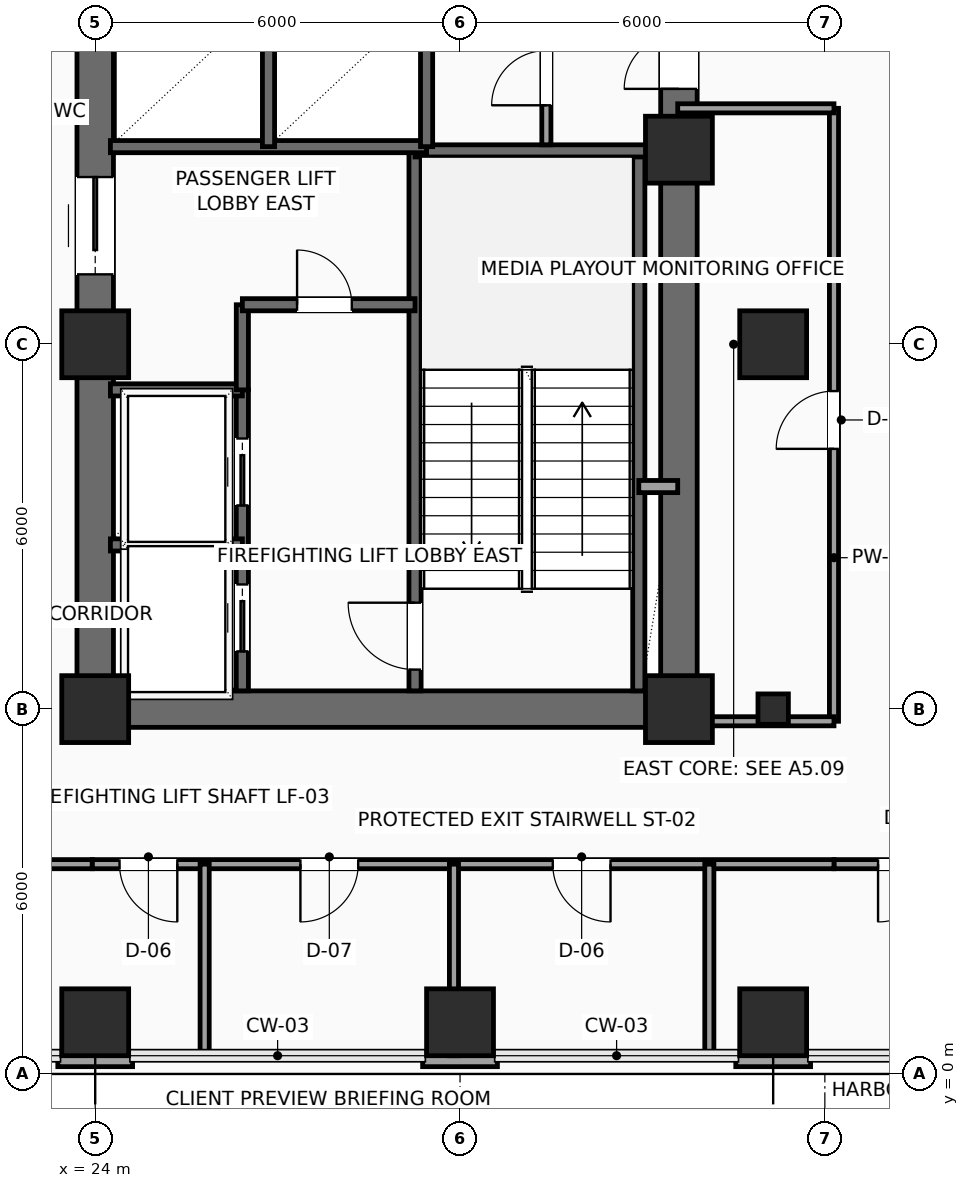
"""IFC4 building model, lengths in metres.
Left out: names, types, materials, properties, quantities, classifications, styles, units other than length and angle.
Written with IfcOpenShell. Run it as: python <this file> out.ifc"""

import sys

from ifc_helpers import new_model, si_unit, direction, frame, frame_2d, origin, origin_2d, place, context, subcontext, project, spatial, rectangle, hollow_rectangle, extrude, element, fill, save


model = new_model("IFC4")
c1 = context("Model", 3, precision=1e-05, world=origin(), true_north=direction((0.0, 1.0)))
c2 = subcontext(c1, "Body", "Model", "MODEL_VIEW")
j1 = project(units=[si_unit("LENGTHUNIT", "METRE"), si_unit("PLANEANGLEUNIT", "RADIAN")], contexts=[c1])
p1 = place(None, origin())
s1 = spatial("IfcSite", under=j1, at=p1, CompositionType="ELEMENT")
p2 = place(p1, origin())
s2 = spatial("IfcBuilding", under=s1, at=p2, CompositionType="ELEMENT")
p3 = place(p2, frame((0.0, 0.0, 160.65)))
s3 = spatial("IfcBuildingStorey", under=s2, at=p3, CompositionType="ELEMENT", Elevation=160.65)
for number, where, z_axis, x_axis in (
    (1, (24.0, 6.0, 0.0), (0.0, 0.0, 1.0), (1.0, 0.0, 0.0)),
    (2, (24.0, 12.0, 0.0), (0.0, 0.0, 1.0), (1.0, 0.0, 0.0)),
    (3, (33.6, 6.0, 0.0), (0.0, 0.0, 1.0), (1.0, 0.0, 0.0)),
    (4, (33.6, 15.2, 0.0), (0.0, 0.0, 1.0), (1.0, 0.0, 0.0)),
    (5, (24.0, 0.85, 0.0), (0.0, 0.0, 1.0), (1.0, 0.0, 0.0)),
    (6, (30.0, 0.85, 0.0), (0.0, 0.0, 1.0), (1.0, 0.0, 0.0)),
    (7, (35.15, 0.85, 0.0), (0.0, 0.0, 1.0), (1.0, 0.0, 0.0)),
):
    element("IfcColumn", number, at=place(p3, frame(where, z_axis=z_axis, x_axis=x_axis)), inside=s3, PredefinedType="COLUMN", context=c2, shape_type="SweptSolid", body=[
        extrude(rectangle(XDim=1.1, YDim=1.1, at=origin_2d()), origin(), (0.0, 0.0, 1.0), 3.75),
    ])
p4 = place(p3, frame((35.15, 6.0, 0.0), z_axis=(0.0, 0.0, 1.0), x_axis=(1.0, 0.0, 0.0)))
e8 = element("IfcColumn", 8, at=p4, inside=s3, PredefinedType="COLUMN", context=c2, shape_type="SweptSolid", body=[
    extrude(hollow_rectangle(XDim=0.5, YDim=0.5, WallThickness=0.025, InnerFilletRadius=0.025, OuterFilletRadius=0.04, at=origin_2d()), origin(), (0.0, 0.0, 1.0), 3.75),
])
p5 = place(p3, frame((35.15, 12.0, 0.0), z_axis=(0.0, 0.0, 1.0), x_axis=(1.0, 0.0, 0.0)))
e9 = element("IfcColumn", 9, at=p5, inside=s3, PredefinedType="COLUMN", context=c2, shape_type="SweptSolid", body=[
    extrude(rectangle(XDim=1.1, YDim=1.1, at=origin_2d()), origin(), (0.0, 0.0, 1.0), 3.75),
])
for number, where, z_axis, x_axis in (
    (10, (35.765, 0.24, 0.0), (0.0, 0.0, 1.0), (-1.0, 0.0, 0.0)),
    (11, (30.615, 0.24, 0.0), (0.0, 0.0, 1.0), (-1.0, 0.0, 0.0)),
    (12, (24.615, 0.24, 0.0), (0.0, 0.0, 1.0), (-1.0, 0.0, 0.0)),
):
    element("IfcWall", number, at=place(p3, frame(where, z_axis=z_axis, x_axis=x_axis)), inside=s3, PredefinedType="SOLIDWALL", context=c2, shape_type="SweptSolid", body=[
        extrude(rectangle(XDim=1.23, YDim=0.24, at=frame_2d((0.615, 0.0))), origin(), (0.0, 0.0, 1.0), 3.425),
    ])
p6 = place(p3, frame((24.0, 6.0, 0.0), z_axis=(0.0, 0.0, 1.0), x_axis=(1.0, 0.0, 0.0)))
e13 = element("IfcWall", 13, at=p6, inside=s3, PredefinedType="SHEAR", context=c2, shape_type="SweptSolid", body=[
    extrude(rectangle(XDim=9.6, YDim=0.6, at=frame_2d((4.8, 0.0))), origin(), (0.0, 0.0, 1.0), 3.425),
])
p7 = place(p3, frame((24.0, 6.0, 0.0), z_axis=(0.0, 0.0, 1.0), x_axis=(0.0, 1.0, 0.0)))
e14 = element("IfcWall", 14, at=p7, inside=s3, PredefinedType="SHEAR", context=c2, shape_type="SweptSolid", body=[
    extrude(rectangle(XDim=12.0, YDim=0.6, at=frame_2d((6.0, 0.0))), origin(), (0.0, 0.0, 1.0), 3.425),
])
p8 = place(p7, frame((7.15, 0.0, 0.0)))
e15 = element("IfcOpeningElement", 15, at=p8, cuts=e14, PredefinedType="OPENING", context=c2, shape_type="SweptSolid", body=[
    extrude(rectangle(XDim=1.6, YDim=2.3, at=frame_2d((0.8, 1.15))), frame((0.0, 0.31, 0.0), z_axis=(0.0, -1.0, 0.0), x_axis=(1.0, 0.0, 0.0)), (0.0, 0.0, 1.0), 0.62),
])
p9 = place(p3, frame((33.6, 6.0, 0.0), z_axis=(0.0, 0.0, 1.0), x_axis=(0.0, 1.0, 0.0)))
e16 = element("IfcWall", 16, at=p9, inside=s3, PredefinedType="SHEAR", context=c2, shape_type="SweptSolid", body=[
    extrude(rectangle(XDim=12.0, YDim=0.6, at=frame_2d((6.0, 0.0))), origin(), (0.0, 0.0, 1.0), 3.425),
])
p10 = place(p9, frame((10.2, 0.0, 0.0)))
e17 = element("IfcOpeningElement", 17, at=p10, cuts=e16, PredefinedType="OPENING", context=c2, shape_type="SweptSolid", body=[
    extrude(rectangle(XDim=0.9, YDim=2.15, at=frame_2d((0.45, 1.075))), frame((0.0, 0.31, 0.0), z_axis=(0.0, -1.0, 0.0), x_axis=(1.0, 0.0, 0.0)), (0.0, 0.0, 1.0), 0.62),
])
p11 = place(p3, frame((29.26, 6.3, 0.0), z_axis=(0.0, 0.0, 1.0), x_axis=(0.0, 1.0, 0.0)))
e18 = element("IfcWall", 18, at=p11, inside=s3, PredefinedType="SHEAR", context=c2, shape_type="SweptSolid", body=[
    extrude(rectangle(XDim=8.88, YDim=0.2, at=frame_2d((4.44, 0.0))), origin(), (0.0, 0.0, 1.0), 3.425),
])
p12 = place(p11, frame((0.35, 0.0, 0.0)))
e19 = element("IfcOpeningElement", 19, at=p12, cuts=e18, PredefinedType="OPENING", context=c2, shape_type="SweptSolid", body=[
    extrude(rectangle(XDim=1.1, YDim=2.2, at=frame_2d((0.55, 1.1))), frame((0.0, 0.11, 0.0), z_axis=(0.0, -1.0, 0.0), x_axis=(1.0, 0.0, 0.0)), (0.0, 0.0, 1.0), 0.22),
])
p13 = place(p3, frame((32.94, 6.3, 0.0), z_axis=(0.0, 0.0, 1.0), x_axis=(0.0, 1.0, 0.0)))
e20 = element("IfcWall", 20, at=p13, inside=s3, PredefinedType="SHEAR", context=c2, shape_type="SweptSolid", body=[
    extrude(rectangle(XDim=8.88, YDim=0.2, at=frame_2d((4.44, 0.0))), origin(), (0.0, 0.0, 1.0), 3.425),
])
p14 = place(p3, frame((29.26, 15.18, 0.0), z_axis=(0.0, 0.0, 1.0), x_axis=(1.0, 0.0, 0.0)))
e21 = element("IfcWall", 21, at=p14, inside=s3, PredefinedType="SHEAR", context=c2, shape_type="SweptSolid", body=[
    extrude(rectangle(XDim=4.04, YDim=0.2, at=frame_2d((2.02, 0.0))), origin(), (0.0, 0.0, 1.0), 3.425),
])
p15 = place(p3, frame((26.42, 6.3, 0.0), z_axis=(0.0, 0.0, 1.0), x_axis=(0.0, 1.0, 0.0)))
e22 = element("IfcWall", 22, at=p15, inside=s3, PredefinedType="SHEAR", context=c2, shape_type="SweptSolid", body=[
    extrude(rectangle(XDim=4.95, YDim=0.2, at=frame_2d((2.475, 0.0))), origin(), (0.0, 0.0, 1.0), 3.425),
])
p16 = place(p15, frame((0.65, 0.0, 0.0)))
e23 = element("IfcOpeningElement", 23, at=p16, cuts=e22, PredefinedType="OPENING", context=c2, shape_type="SweptSolid", body=[
    extrude(rectangle(XDim=1.1, YDim=2.2, at=frame_2d((0.55, 1.1))), frame((0.0, 0.11, 0.0), z_axis=(0.0, -1.0, 0.0), x_axis=(1.0, 0.0, 0.0)), (0.0, 0.0, 1.0), 0.22),
])
p17 = place(p15, frame((3.05, 0.0, 0.0)))
e24 = element("IfcOpeningElement", 24, at=p17, cuts=e22, PredefinedType="OPENING", context=c2, shape_type="SweptSolid", body=[
    extrude(rectangle(XDim=1.1, YDim=2.2, at=frame_2d((0.55, 1.1))), frame((0.0, 0.11, 0.0), z_axis=(0.0, -1.0, 0.0), x_axis=(1.0, 0.0, 0.0)), (0.0, 0.0, 1.0), 0.22),
])
for number, where, z_axis, x_axis in (
    (25, (24.25, 8.7, 0.0), (0.0, 0.0, 1.0), (1.0, 0.0, 0.0)),
    (26, (24.25, 11.25, 0.0), (0.0, 0.0, 1.0), (1.0, 0.0, 0.0)),
):
    element("IfcWall", number, at=place(p3, frame(where, z_axis=z_axis, x_axis=x_axis)), inside=s3, PredefinedType="SHEAR", context=c2, shape_type="SweptSolid", body=[
        extrude(rectangle(XDim=2.17, YDim=0.2, at=frame_2d((1.085, 0.0))), origin(), (0.0, 0.0, 1.0), 3.425),
    ])
p18 = place(p3, frame((26.42, 11.25, 0.0), z_axis=(0.0, 0.0, 1.0), x_axis=(0.0, 1.0, 0.0)))
e27 = element("IfcWall", 27, at=p18, inside=s3, PredefinedType="SHEAR", context=c2, shape_type="SweptSolid", body=[
    extrude(rectangle(XDim=1.4, YDim=0.2, at=frame_2d((0.7, 0.0))), origin(), (0.0, 0.0, 1.0), 3.425),
])
p19 = place(p3, frame((26.42, 12.65, 0.0), z_axis=(0.0, 0.0, 1.0), x_axis=(1.0, 0.0, 0.0)))
e28 = element("IfcWall", 28, at=p19, inside=s3, PredefinedType="SHEAR", context=c2, shape_type="SweptSolid", body=[
    extrude(rectangle(XDim=2.84, YDim=0.2, at=frame_2d((1.42, 0.0))), origin(), (0.0, 0.0, 1.0), 3.425),
])
p20 = place(p19, frame((0.9, 0.0, 0.0)))
e29 = element("IfcOpeningElement", 29, at=p20, cuts=e28, PredefinedType="OPENING", context=c2, shape_type="SweptSolid", body=[
    extrude(rectangle(XDim=0.9, YDim=2.15, at=frame_2d((0.45, 1.075))), frame((0.0, 0.11, 0.0), z_axis=(0.0, -1.0, 0.0), x_axis=(1.0, 0.0, 0.0)), (0.0, 0.0, 1.0), 0.22),
])
p21 = place(p3, frame((32.94, 9.66, 0.0), z_axis=(0.0, 0.0, 1.0), x_axis=(1.0, 0.0, 0.0)))
e30 = element("IfcWall", 30, at=p21, inside=s3, PredefinedType="SOLIDWALL", context=c2, shape_type="SweptSolid", body=[
    extrude(rectangle(XDim=0.64, YDim=0.2, at=frame_2d((0.32, 0.0))), origin(), (0.0, 0.0, 1.0), 3.425),
])
p22 = place(p3, frame((24.25, 15.25, 0.0), z_axis=(0.0, 0.0, 1.0), x_axis=(1.0, 0.0, 0.0)))
e31 = element("IfcWall", 31, at=p22, inside=s3, PredefinedType="SHEAR", context=c2, shape_type="SweptSolid", body=[
    extrude(rectangle(XDim=5.2, YDim=0.2, at=frame_2d((2.6, 0.0))), origin(), (0.0, 0.0, 1.0), 3.425),
])
p23 = place(p3, frame((26.85, 15.25, 0.0), z_axis=(0.0, 0.0, 1.0), x_axis=(0.0, 1.0, 0.0)))
e32 = element("IfcWall", 32, at=p23, inside=s3, PredefinedType="SHEAR", context=c2, shape_type="SweptSolid", body=[
    extrude(rectangle(XDim=2.4, YDim=0.2, at=frame_2d((1.2, 0.0))), origin(), (0.0, 0.0, 1.0), 3.425),
])
p24 = place(p3, frame((29.45, 15.25, 0.0), z_axis=(0.0, 0.0, 1.0), x_axis=(0.0, 1.0, 0.0)))
e33 = element("IfcWall", 33, at=p24, inside=s3, PredefinedType="SHEAR", context=c2, shape_type="SweptSolid", body=[
    extrude(rectangle(XDim=2.45, YDim=0.2, at=frame_2d((1.225, 0.0))), origin(), (0.0, 0.0, 1.0), 3.425),
])
p25 = place(p3, frame((31.42, 15.28, 0.0), z_axis=(0.0, 0.0, 1.0), x_axis=(0.0, 1.0, 0.0)))
e34 = element("IfcWall", 34, at=p25, inside=s3, PredefinedType="PARTITIONING", context=c2, shape_type="SweptSolid", body=[
    extrude(rectangle(XDim=2.42, YDim=0.15, at=frame_2d((1.21, 0.0))), origin(), (0.0, 0.0, 1.0), 3.425),
])
p26 = place(p25, frame((0.65, 0.0, 0.0)))
e35 = element("IfcOpeningElement", 35, at=p26, cuts=e34, PredefinedType="OPENING", context=c2, shape_type="SweptSolid", body=[
    extrude(rectangle(XDim=0.9, YDim=2.15, at=frame_2d((0.45, 1.075))), frame((0.0, 0.085, 0.0), z_axis=(0.0, -1.0, 0.0), x_axis=(1.0, 0.0, 0.0)), (0.0, 0.0, 1.0), 0.17),
])
p27 = place(p3, frame((36.15, 5.8, 0.0), z_axis=(0.0, 0.0, 1.0), x_axis=(0.0, 1.0, 0.0)))
e36 = element("IfcWall", 36, at=p27, inside=s3, PredefinedType="PARTITIONING", context=c2, shape_type="SweptSolid", body=[
    extrude(rectangle(XDim=10.08, YDim=0.15, at=frame_2d((5.04, 0.0))), origin(), (0.0, 0.0, 1.0), 3.425),
])
p28 = place(p27, frame((4.48, 0.0, 0.0)))
e37 = element("IfcOpeningElement", 37, at=p28, cuts=e36, PredefinedType="OPENING", context=c2, shape_type="SweptSolid", body=[
    extrude(rectangle(XDim=0.95, YDim=2.15, at=frame_2d((0.475, 1.075))), frame((0.0, 0.085, 0.0), z_axis=(0.0, -1.0, 0.0), x_axis=(1.0, 0.0, 0.0)), (0.0, 0.0, 1.0), 0.17),
])
p29 = place(p3, frame((36.15, 15.88, 0.0), z_axis=(0.0, 0.0, 1.0), x_axis=(-1.0, 0.0, 0.0)))
e38 = element("IfcWall", 38, at=p29, inside=s3, PredefinedType="PARTITIONING", context=c2, shape_type="SweptSolid", body=[
    extrude(rectangle(XDim=2.57, YDim=0.15, at=frame_2d((1.285, 0.0))), origin(), (0.0, 0.0, 1.0), 3.425),
])
p30 = place(p3, frame((38.55, 3.45, 0.0), z_axis=(0.0, 0.0, 1.0), x_axis=(-1.0, 0.0, 0.0)))
e39 = element("IfcWall", 39, at=p30, inside=s3, PredefinedType="PARTITIONING", context=c2, shape_type="SweptSolid", body=[
    extrude(rectangle(XDim=2.4, YDim=0.15, at=frame_2d((1.2, 0.0))), origin(), (0.0, 0.0, 1.0), 2.967),
])
p31 = place(p30, frame((0.725, 0.0, 0.0)))
e40 = element("IfcOpeningElement", 40, at=p31, cuts=e39, PredefinedType="OPENING", context=c2, shape_type="SweptSolid", body=[
    extrude(rectangle(XDim=0.95, YDim=2.15, at=frame_2d((0.475, 1.075))), frame((0.0, 0.085, 0.0), z_axis=(0.0, -1.0, 0.0), x_axis=(1.0, 0.0, 0.0)), (0.0, 0.0, 1.0), 0.17),
])
p32 = place(p3, frame((36.15, 3.45, 0.0), z_axis=(0.0, 0.0, 1.0), x_axis=(-1.0, 0.0, 0.0)))
e41 = element("IfcWall", 41, at=p32, inside=s3, PredefinedType="PARTITIONING", context=c2, shape_type="SweptSolid", body=[
    extrude(rectangle(XDim=12.2, YDim=0.15, at=frame_2d((6.1, 0.0))), origin(), (0.0, 0.0, 1.0), 2.967),
])
p33 = place(p32, frame((10.8, 0.0, 0.0)))
e42 = element("IfcOpeningElement", 42, at=p33, cuts=e41, PredefinedType="OPENING", context=c2, shape_type="SweptSolid", body=[
    extrude(rectangle(XDim=0.95, YDim=2.15, at=frame_2d((0.475, 1.075))), frame((0.0, 0.085, 0.0), z_axis=(0.0, -1.0, 0.0), x_axis=(1.0, 0.0, 0.0)), (0.0, 0.0, 1.0), 0.17),
])
p34 = place(p32, frame((7.825, 0.0, 0.0)))
e43 = element("IfcOpeningElement", 43, at=p34, cuts=e41, PredefinedType="OPENING", context=c2, shape_type="SweptSolid", body=[
    extrude(rectangle(XDim=0.95, YDim=2.15, at=frame_2d((0.475, 1.075))), frame((0.0, 0.085, 0.0), z_axis=(0.0, -1.0, 0.0), x_axis=(1.0, 0.0, 0.0)), (0.0, 0.0, 1.0), 0.17),
])
p35 = place(p32, frame((3.675, 0.0, 0.0)))
e44 = element("IfcOpeningElement", 44, at=p35, cuts=e41, PredefinedType="OPENING", context=c2, shape_type="SweptSolid", body=[
    extrude(rectangle(XDim=0.95, YDim=2.15, at=frame_2d((0.475, 1.075))), frame((0.0, 0.085, 0.0), z_axis=(0.0, -1.0, 0.0), x_axis=(1.0, 0.0, 0.0)), (0.0, 0.0, 1.0), 0.17),
])
p36 = place(p3, frame((23.95, 3.45, 0.0), z_axis=(0.0, 0.0, 1.0), x_axis=(-1.0, 0.0, 0.0)))
e45 = element("IfcWall", 45, at=p36, inside=s3, PredefinedType="PARTITIONING", context=c2, shape_type="SweptSolid", body=[
    extrude(rectangle(XDim=2.6, YDim=0.15, at=frame_2d((1.3, 0.0))), origin(), (0.0, 0.0, 1.0), 2.967),
])
for number, where, z_axis, x_axis in (
    (46, (25.8, 0.3, 0.0), (0.0, 0.0, 1.0), (0.0, 1.0, 0.0)),
    (47, (29.9, 0.3, 0.0), (0.0, 0.0, 1.0), (0.0, 1.0, 0.0)),
    (48, (34.1, 0.3, 0.0), (0.0, 0.0, 1.0), (0.0, 1.0, 0.0)),
):
    element("IfcWall", number, at=place(p3, frame(where, z_axis=z_axis, x_axis=x_axis)), inside=s3, PredefinedType="PARTITIONING", context=c2, shape_type="SweptSolid", body=[
        extrude(rectangle(XDim=3.15, YDim=0.15, at=frame_2d((1.575, 0.0))), origin(), (0.0, 0.0, 1.0), 3.425),
    ])
p37 = place(p3, frame((33.65, 5.8, 0.0), z_axis=(0.0, 0.0, 1.0), x_axis=(1.0, 0.0, 0.0)))
e49 = element("IfcWall", 49, at=p37, inside=s3, PredefinedType="PARTITIONING", context=c2, shape_type="SweptSolid", body=[
    extrude(rectangle(XDim=2.5, YDim=0.15, at=frame_2d((1.25, 0.0))), origin(), (0.0, 0.0, 1.0), 2.917),
])
p38 = place(p8, origin())
e50 = element("IfcDoor", 50, at=p38, inside=s3, OperationType="DOUBLE_DOOR_SLIDING", PredefinedType="DOOR", context=c2, shape_type="SweptSolid", body=[
    extrude(rectangle(XDim=1.6, YDim=2.3, at=frame_2d((0.8, 1.15))), frame((0.0, 0.025, 0.0), z_axis=(0.0, -1.0, 0.0), x_axis=(1.0, 0.0, 0.0)), (0.0, 0.0, 1.0), 0.05),
])
fill(e15, e50)
p39 = place(p10, origin())
e51 = element("IfcDoor", 51, at=p39, inside=s3, OperationType="SINGLE_SWING_LEFT", PredefinedType="DOOR", context=c2, shape_type="SweptSolid", body=[
    extrude(rectangle(XDim=0.9, YDim=2.15, at=frame_2d((0.45, 1.075))), frame((0.0, 0.025, 0.0), z_axis=(0.0, -1.0, 0.0), x_axis=(1.0, 0.0, 0.0)), (0.0, 0.0, 1.0), 0.05),
])
fill(e17, e51)
p40 = place(p12, origin())
e52 = element("IfcDoor", 52, at=p40, inside=s3, OperationType="SINGLE_SWING_RIGHT", PredefinedType="DOOR", context=c2, shape_type="SweptSolid", body=[
    extrude(rectangle(XDim=1.1, YDim=2.2, at=frame_2d((0.55, 1.1))), frame((0.0, 0.025, 0.0), z_axis=(0.0, -1.0, 0.0), x_axis=(1.0, 0.0, 0.0)), (0.0, 0.0, 1.0), 0.05),
])
fill(e19, e52)
p41 = place(p16, origin())
e53 = element("IfcDoor", 53, at=p41, inside=s3, OperationType="SLIDING_TO_LEFT", PredefinedType="DOOR", context=c2, shape_type="SweptSolid", body=[
    extrude(rectangle(XDim=1.1, YDim=2.2, at=frame_2d((0.55, 1.1))), frame((0.0, 0.025, 0.0), z_axis=(0.0, -1.0, 0.0), x_axis=(1.0, 0.0, 0.0)), (0.0, 0.0, 1.0), 0.05),
])
fill(e23, e53)
p42 = place(p17, origin())
e54 = element("IfcDoor", 54, at=p42, inside=s3, OperationType="SLIDING_TO_LEFT", PredefinedType="DOOR", context=c2, shape_type="SweptSolid", body=[
    extrude(rectangle(XDim=1.1, YDim=2.2, at=frame_2d((0.55, 1.1))), frame((0.0, 0.025, 0.0), z_axis=(0.0, -1.0, 0.0), x_axis=(1.0, 0.0, 0.0)), (0.0, 0.0, 1.0), 0.05),
])
fill(e24, e54)
p43 = place(p20, origin())
e55 = element("IfcDoor", 55, at=p43, inside=s3, OperationType="SINGLE_SWING_LEFT", PredefinedType="DOOR", context=c2, shape_type="SweptSolid", body=[
    extrude(rectangle(XDim=0.9, YDim=2.15, at=frame_2d((0.45, 1.075))), frame((0.0, 0.025, 0.0), z_axis=(0.0, -1.0, 0.0), x_axis=(1.0, 0.0, 0.0)), (0.0, 0.0, 1.0), 0.05),
])
fill(e29, e55)
p44 = place(p26, origin())
e56 = element("IfcDoor", 56, at=p44, inside=s3, OperationType="SINGLE_SWING_LEFT", PredefinedType="DOOR", context=c2, shape_type="SweptSolid", body=[
    extrude(rectangle(XDim=0.9, YDim=2.15, at=frame_2d((0.45, 1.075))), frame((0.0, 0.025, 0.0), z_axis=(0.0, -1.0, 0.0), x_axis=(1.0, 0.0, 0.0)), (0.0, 0.0, 1.0), 0.05),
])
fill(e35, e56)
p45 = place(p28, origin())
e57 = element("IfcDoor", 57, at=p45, inside=s3, OperationType="SINGLE_SWING_LEFT", PredefinedType="DOOR", context=c2, shape_type="SweptSolid", body=[
    extrude(rectangle(XDim=0.95, YDim=2.15, at=frame_2d((0.475, 1.075))), frame((0.0, 0.025, 0.0), z_axis=(0.0, -1.0, 0.0), x_axis=(1.0, 0.0, 0.0)), (0.0, 0.0, 1.0), 0.05),
])
fill(e37, e57)
p46 = place(p31, origin())
e58 = element("IfcDoor", 58, at=p46, inside=s3, OperationType="SINGLE_SWING_RIGHT", PredefinedType="DOOR", context=c2, shape_type="SweptSolid", body=[
    extrude(rectangle(XDim=0.95, YDim=2.15, at=frame_2d((0.475, 1.075))), frame((0.0, 0.025, 0.0), z_axis=(0.0, -1.0, 0.0), x_axis=(1.0, 0.0, 0.0)), (0.0, 0.0, 1.0), 0.05),
])
fill(e40, e58)
p47 = place(p33, origin())
e59 = element("IfcDoor", 59, at=p47, inside=s3, OperationType="SINGLE_SWING_LEFT", PredefinedType="DOOR", context=c2, shape_type="SweptSolid", body=[
    extrude(rectangle(XDim=0.95, YDim=2.15, at=frame_2d((0.475, 1.075))), frame((0.0, 0.025, 0.0), z_axis=(0.0, -1.0, 0.0), x_axis=(1.0, 0.0, 0.0)), (0.0, 0.0, 1.0), 0.05),
])
fill(e42, e59)
p48 = place(p34, origin())
e60 = element("IfcDoor", 60, at=p48, inside=s3, OperationType="SINGLE_SWING_RIGHT", PredefinedType="DOOR", context=c2, shape_type="SweptSolid", body=[
    extrude(rectangle(XDim=0.95, YDim=2.15, at=frame_2d((0.475, 1.075))), frame((0.0, 0.025, 0.0), z_axis=(0.0, -1.0, 0.0), x_axis=(1.0, 0.0, 0.0)), (0.0, 0.0, 1.0), 0.05),
])
fill(e43, e60)
p49 = place(p35, origin())
e61 = element("IfcDoor", 61, at=p49, inside=s3, OperationType="SINGLE_SWING_LEFT", PredefinedType="DOOR", context=c2, shape_type="SweptSolid", body=[
    extrude(rectangle(XDim=0.95, YDim=2.15, at=frame_2d((0.475, 1.075))), frame((0.0, 0.025, 0.0), z_axis=(0.0, -1.0, 0.0), x_axis=(1.0, 0.0, 0.0)), (0.0, 0.0, 1.0), 0.05),
])
fill(e44, e61)
save(model, sys.argv[1])
